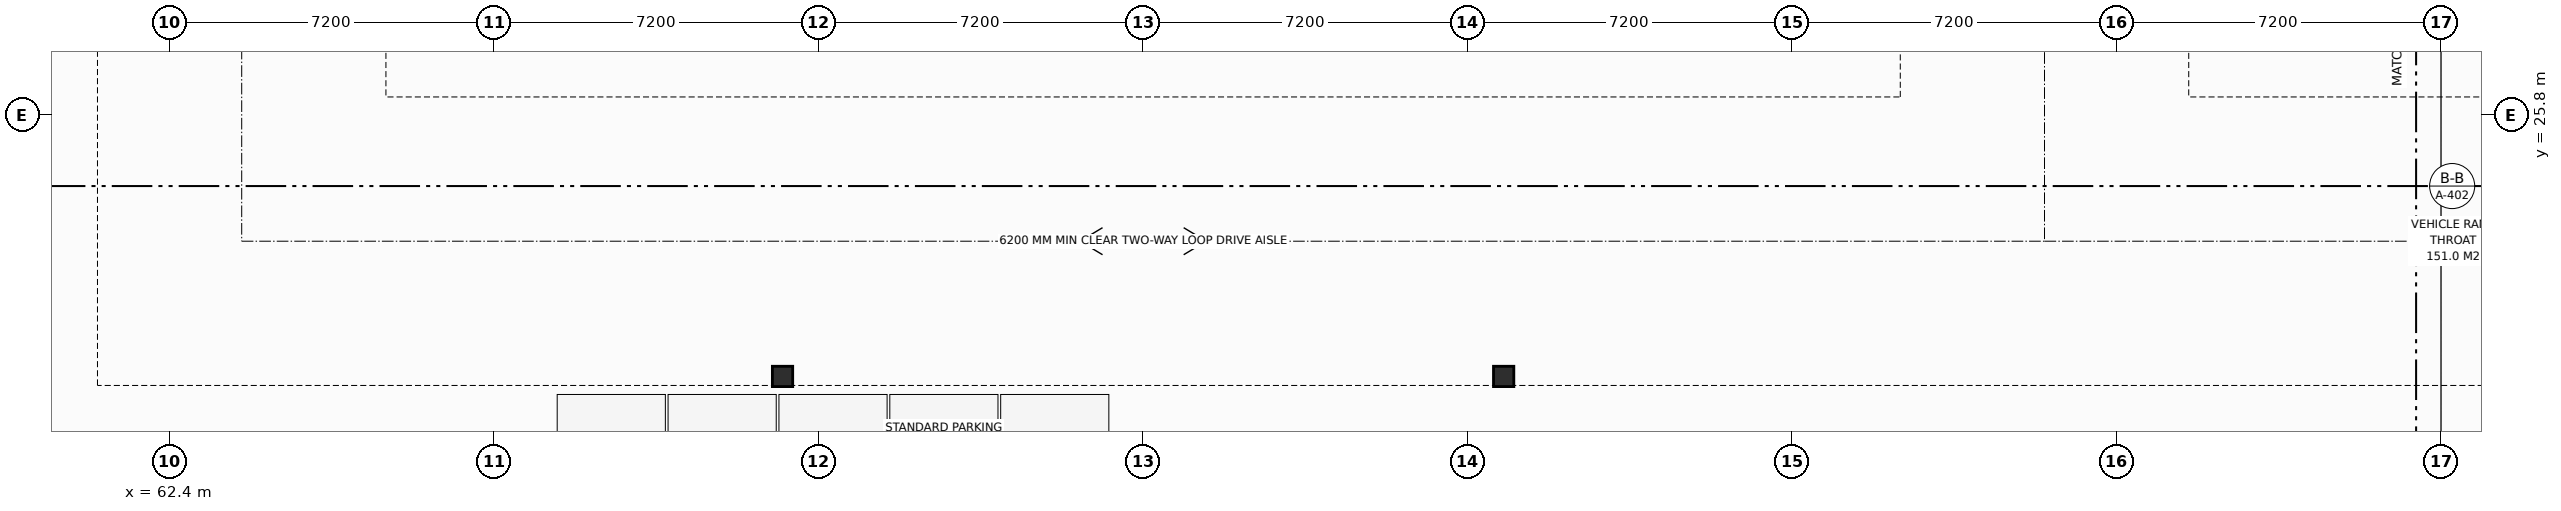
"""IFC4 building model, lengths in metres.
Left out: names, types, materials, properties, quantities, classifications, styles, units other than length and angle.
Written with IfcOpenShell. Run it as: python <this file> out.ifc"""

import sys

from ifc_helpers import new_model, si_unit, direction, frame, origin, origin_2d, place, context, subcontext, project, spatial, rectangle, extrude, element, save


model = new_model("IFC4")
c1 = context("Model", 3, precision=1e-05, world=origin(), true_north=direction((0.0, 1.0)))
c2 = subcontext(c1, "Body", "Model", "MODEL_VIEW")
j1 = project(units=[si_unit("LENGTHUNIT", "METRE"), si_unit("PLANEANGLEUNIT", "RADIAN")], contexts=[c1])
p1 = place(None, origin())
s1 = spatial("IfcSite", under=j1, at=p1, CompositionType="ELEMENT")
p2 = place(p1, origin())
s2 = spatial("IfcBuilding", under=s1, at=p2, CompositionType="ELEMENT")
p3 = place(p2, frame((0.0, 0.0, -3.8)))
s3 = spatial("IfcBuildingStorey", under=s2, at=p3, CompositionType="ELEMENT", Elevation=-3.8)
for number, where, z_axis, x_axis in (
    (1, (76.0, 20.0, 0.0), (0.0, 0.0, 1.0), (1.0, 0.0, 0.0)),
    (2, (92.0, 20.0, 0.0), (0.0, 0.0, 1.0), (1.0, 0.0, 0.0)),
):
    element("IfcColumn", number, at=place(p3, frame(where, z_axis=z_axis, x_axis=x_axis)), inside=s3, PredefinedType="COLUMN", context=c2, shape_type="SweptSolid", body=[
        extrude(rectangle(XDim=0.45, YDim=0.45, at=origin_2d()), origin(), (0.0, 0.0, 1.0), 3.8),
    ])
save(model, sys.argv[1])
